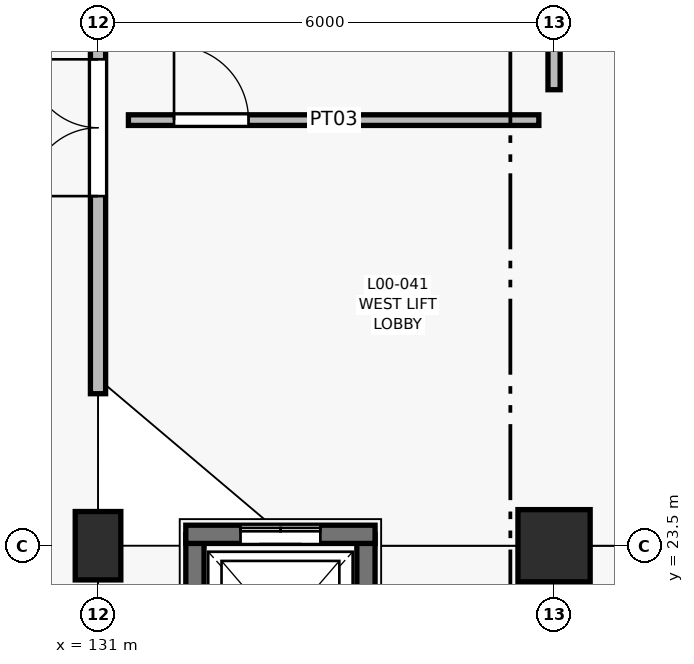
"""IFC4 building model, lengths in metres.
Left out: names, types, materials, properties, quantities, classifications, styles, units other than length and angle.
Written with IfcOpenShell. Run it as: python <this file> out.ifc"""

import sys

from ifc_helpers import new_model, si_unit, direction, frame, frame_2d, origin, origin_2d, place, context, subcontext, project, spatial, rectangle, extrude, element, fill, save


model = new_model("IFC4")
c1 = context("Model", 3, precision=1e-05, world=origin(), true_north=direction((0.0, 1.0)))
c2 = subcontext(c1, "Body", "Model", "MODEL_VIEW")
j1 = project(units=[si_unit("LENGTHUNIT", "METRE"), si_unit("PLANEANGLEUNIT", "RADIAN")], contexts=[c1])
p1 = place(None, origin())
s1 = spatial("IfcSite", under=j1, at=p1, CompositionType="ELEMENT")
p2 = place(p1, origin())
s2 = spatial("IfcBuilding", under=s1, at=p2, CompositionType="ELEMENT")
p3 = place(p2, origin())
s3 = spatial("IfcBuildingStorey", under=s2, at=p3, CompositionType="ELEMENT", Elevation=0.0)
p4 = place(p3, frame((131.0, 23.5, 0.0), z_axis=(0.0, 0.0, 1.0), x_axis=(1.0, 0.0, 0.0)))
e1 = element("IfcColumn", 1, at=p4, inside=s3, PredefinedType="COLUMN", context=c2, shape_type="SweptSolid", body=[
    extrude(rectangle(XDim=0.6, YDim=0.9, at=origin_2d()), origin(), (0.0, 0.0, 1.0), 4.8),
])
p5 = place(p3, frame((137.0, 23.5, 0.0), z_axis=(0.0, 0.0, 1.0), x_axis=(1.0, 0.0, 0.0)))
e2 = element("IfcColumn", 2, at=p5, inside=s3, PredefinedType="COLUMN", context=c2, shape_type="SweptSolid", body=[
    extrude(rectangle(XDim=0.95, YDim=0.95, at=origin_2d()), origin(), (0.0, 0.0, 1.0), 4.8),
])
p6 = place(p3, frame((132.275, 21.15, -1.3), z_axis=(0.0, 0.0, 1.0), x_axis=(0.0, 1.0, 0.0)))
e3 = element("IfcWall", 3, at=p6, inside=s3, PredefinedType="SHEAR", context=c2, shape_type="SweptSolid", body=[
    extrude(rectangle(XDim=2.5, YDim=0.24, at=frame_2d((1.25, 0.0))), origin(), (0.0, 0.0, 1.0), 6.1),
])
p7 = place(p3, frame((134.525, 23.65, 0.0), z_axis=(0.0, 0.0, 1.0), x_axis=(0.0, -1.0, 0.0)))
e4 = element("IfcWall", 4, at=p7, inside=s3, PredefinedType="SHEAR", context=c2, shape_type="SweptSolid", body=[
    extrude(rectangle(XDim=2.5, YDim=0.24, at=frame_2d((1.25, 0.0))), origin(), (0.0, 0.0, 1.0), 4.8),
])
p8 = place(p3, frame((132.155, 23.65, 0.0), z_axis=(0.0, 0.0, 1.0), x_axis=(1.0, 0.0, 0.0)))
e5 = element("IfcWall", 5, at=p8, inside=s3, PredefinedType="SHEAR", context=c2, shape_type="SweptSolid", body=[
    extrude(rectangle(XDim=2.49, YDim=0.24, at=frame_2d((1.245, 0.0))), origin(), (0.0, 0.0, 1.0), 4.8),
])
p9 = place(p8, frame((0.72, 0.0, 0.0)))
e6 = element("IfcOpeningElement", 6, at=p9, cuts=e5, PredefinedType="OPENING", context=c2, shape_type="SweptSolid", body=[
    extrude(rectangle(XDim=1.05, YDim=2.1, at=frame_2d((0.525, 1.05))), frame((0.0, 0.13, 0.0), z_axis=(0.0, -1.0, 0.0), x_axis=(1.0, 0.0, 0.0)), (0.0, 0.0, 1.0), 0.26),
])
p10 = place(p3, frame((131.4, 29.1, 0.0), z_axis=(0.0, 0.0, 1.0), x_axis=(1.0, 0.0, 0.0)))
e7 = element("IfcWall", 7, at=p10, inside=s3, PredefinedType="PARTITIONING", context=c2, shape_type="SweptSolid", body=[
    extrude(rectangle(XDim=5.4, YDim=0.14, at=frame_2d((2.7, 0.0))), origin(), (0.0, 0.0, 1.0), 2.605),
])
p11 = place(p10, frame((0.6, 0.0, 0.0)))
e8 = element("IfcOpeningElement", 8, at=p11, cuts=e7, PredefinedType="OPENING", context=c2, shape_type="SweptSolid", body=[
    extrude(rectangle(XDim=0.98, YDim=2.1, at=frame_2d((0.49, 1.05))), frame((0.0, 0.08, 0.0), z_axis=(0.0, -1.0, 0.0), x_axis=(1.0, 0.0, 0.0)), (0.0, 0.0, 1.0), 0.16),
])
p12 = place(p3, frame((131.0, 25.5, 0.0), z_axis=(0.0, 0.0, 1.0), x_axis=(0.0, 1.0, 0.0)))
e9 = element("IfcWall", 9, at=p12, inside=s3, PredefinedType="PARTITIONING", context=c2, shape_type="SweptSolid", body=[
    extrude(rectangle(XDim=7.0, YDim=0.2, at=frame_2d((3.5, 0.0))), origin(), (0.0, 0.0, 1.0), 2.605),
])
p13 = place(p12, frame((2.6, 0.0, 0.0)))
e10 = element("IfcOpeningElement", 10, at=p13, cuts=e9, PredefinedType="OPENING", context=c2, shape_type="SweptSolid", body=[
    extrude(rectangle(XDim=1.8, YDim=2.25, at=frame_2d((0.9, 1.125))), frame((0.0, 0.11, 0.0), z_axis=(0.0, -1.0, 0.0), x_axis=(1.0, 0.0, 0.0)), (0.0, 0.0, 1.0), 0.22),
])
p14 = place(p3, frame((137.0, 29.5, 0.0), z_axis=(0.0, 0.0, 1.0), x_axis=(0.0, 1.0, 0.0)))
e11 = element("IfcWall", 11, at=p14, inside=s3, PredefinedType="PARTITIONING", context=c2, shape_type="SweptSolid", body=[
    extrude(rectangle(XDim=3.3, YDim=0.16, at=frame_2d((1.65, 0.0))), origin(), (0.0, 0.0, 1.0), 3.645),
])
p15 = place(p14, frame((1.16, 0.0, 0.0)))
e12 = element("IfcOpeningElement", 12, at=p15, cuts=e11, PredefinedType="OPENING", context=c2, shape_type="SweptSolid", body=[
    extrude(rectangle(XDim=0.98, YDim=2.1, at=frame_2d((0.49, 1.05))), frame((0.0, 0.09, 0.0), z_axis=(0.0, -1.0, 0.0), x_axis=(1.0, 0.0, 0.0)), (0.0, 0.0, 1.0), 0.18),
])
p16 = place(p9, origin())
e13 = element("IfcDoor", 13, at=p16, inside=s3, OperationType="DOUBLE_DOOR_SLIDING", PredefinedType="USERDEFINED", context=c2, shape_type="SweptSolid", body=[
    extrude(rectangle(XDim=1.05, YDim=2.1, at=frame_2d((0.525, 1.05))), frame((0.0, 0.025, 0.0), z_axis=(0.0, -1.0, 0.0), x_axis=(1.0, 0.0, 0.0)), (0.0, 0.0, 1.0), 0.05),
])
fill(e6, e13)
p17 = place(p11, origin())
e14 = element("IfcDoor", 14, at=p17, inside=s3, OperationType="SINGLE_SWING_LEFT", PredefinedType="DOOR", context=c2, shape_type="SweptSolid", body=[
    extrude(rectangle(XDim=0.98, YDim=2.1, at=frame_2d((0.49, 1.05))), frame((0.0, 0.025, 0.0), z_axis=(0.0, -1.0, 0.0), x_axis=(1.0, 0.0, 0.0)), (0.0, 0.0, 1.0), 0.05),
])
fill(e8, e14)
p18 = place(p13, origin())
e15 = element("IfcDoor", 15, at=p18, inside=s3, OperationType="DOUBLE_DOOR_SINGLE_SWING", PredefinedType="DOOR", context=c2, shape_type="SweptSolid", body=[
    extrude(rectangle(XDim=1.8, YDim=2.25, at=frame_2d((0.9, 1.125))), frame((0.0, 0.025, 0.0), z_axis=(0.0, -1.0, 0.0), x_axis=(1.0, 0.0, 0.0)), (0.0, 0.0, 1.0), 0.05),
])
fill(e10, e15)
save(model, sys.argv[1])
